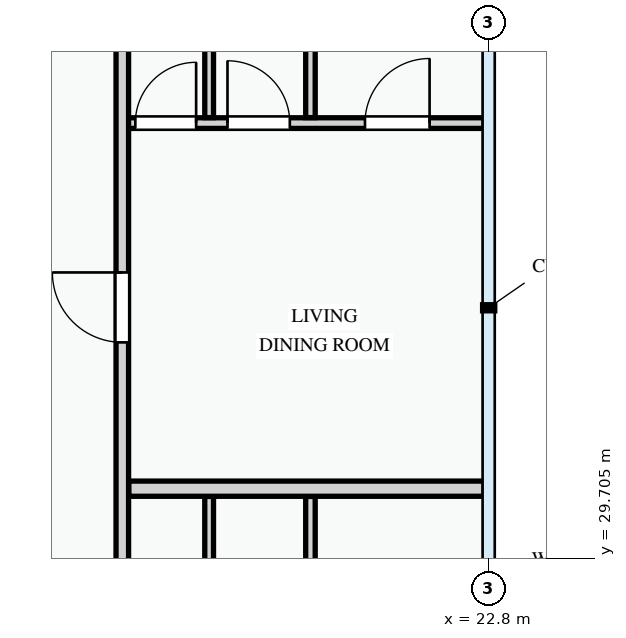
"""IFC4 building model, lengths in metres.
Left out: names, types, materials, properties, quantities, classifications, styles, units other than length and angle.
Written with IfcOpenShell. Run it as: python <this file> out.ifc"""

import sys

from ifc_helpers import new_model, si_unit, direction, frame, frame_2d, origin, place, context, subcontext, project, spatial, rectangle, extrude, element, fill, save


model = new_model("IFC4")
c1 = context("Model", 3, precision=1e-05, world=origin(), true_north=direction((0.0, 1.0)))
c2 = subcontext(c1, "Body", "Model", "MODEL_VIEW")
j1 = project(units=[si_unit("LENGTHUNIT", "METRE"), si_unit("PLANEANGLEUNIT", "RADIAN")], contexts=[c1])
p1 = place(None, origin())
s1 = spatial("IfcSite", under=j1, at=p1, CompositionType="ELEMENT")
p2 = place(p1, origin())
s2 = spatial("IfcBuilding", under=s1, at=p2, CompositionType="ELEMENT")
p3 = place(p2, frame((0.0, 0.0, 31.2)))
s3 = spatial("IfcBuildingStorey", under=s2, at=p3, CompositionType="ELEMENT", Elevation=31.2)
p4 = place(p3, frame((20.455, 26.553, 0.0), z_axis=(0.0, 0.0, 1.0), x_axis=(0.0, 1.0, 0.0)))
e1 = element("IfcWall", 1, at=p4, inside=s3, PredefinedType="PARTITIONING", context=c2, shape_type="SweptSolid", body=[
    extrude(rectangle(XDim=3.965, YDim=0.125, at=frame_2d((1.983, 0.0))), origin(), (0.0, 0.0, 1.0), 3.0),
])
p5 = place(p3, frame((19.122, 26.553, 0.0), z_axis=(0.0, 0.0, 1.0), x_axis=(0.0, 1.0, 0.0)))
e2 = element("IfcWall", 2, at=p5, inside=s3, PredefinedType="PARTITIONING", context=c2, shape_type="SweptSolid", body=[
    extrude(rectangle(XDim=3.965, YDim=0.115, at=frame_2d((1.983, 0.0))), origin(), (0.0, 0.0, 1.0), 3.0),
])
p6 = place(p3, frame((17.98, 35.43, 0.0), z_axis=(0.0, 0.0, 1.0), x_axis=(1.0, 0.0, 0.0)))
e3 = element("IfcWall", 3, at=p6, inside=s3, PredefinedType="PARTITIONING", context=c2, shape_type="SweptSolid", body=[
    extrude(rectangle(XDim=4.76, YDim=0.14, at=frame_2d((2.38, 0.0))), origin(), (0.0, 0.0, 1.0), 3.0),
])
p7 = place(p6, frame((0.171, 0.0, 0.0)))
e4 = element("IfcOpeningElement", 4, at=p7, cuts=e3, PredefinedType="OPENING", context=c2, shape_type="SweptSolid", body=[
    extrude(rectangle(XDim=0.8, YDim=2.1, at=frame_2d((0.4, 1.05))), frame((0.0, 0.08, 0.0), z_axis=(0.0, -1.0, 0.0), x_axis=(1.0, 0.0, 0.0)), (0.0, 0.0, 1.0), 0.16),
])
p8 = place(p6, frame((1.384, 0.0, 0.0)))
e5 = element("IfcOpeningElement", 5, at=p8, cuts=e3, PredefinedType="OPENING", context=c2, shape_type="SweptSolid", body=[
    extrude(rectangle(XDim=0.82, YDim=2.08, at=frame_2d((0.41, 1.04))), frame((0.0, 0.08, 0.0), z_axis=(0.0, -1.0, 0.0), x_axis=(1.0, 0.0, 0.0)), (0.0, 0.0, 1.0), 0.16),
])
p9 = place(p6, frame((3.193, 0.0, 0.0)))
e6 = element("IfcOpeningElement", 6, at=p9, cuts=e3, PredefinedType="OPENING", context=c2, shape_type="SweptSolid", body=[
    extrude(rectangle(XDim=0.85, YDim=2.1, at=frame_2d((0.425, 1.05))), frame((0.0, 0.08, 0.0), z_axis=(0.0, -1.0, 0.0), x_axis=(1.0, 0.0, 0.0)), (0.0, 0.0, 1.0), 0.16),
])
p10 = place(p3, frame((20.455, 35.502, 0.0), z_axis=(0.0, 0.0, 1.0), x_axis=(0.0, 1.0, 0.0)))
e7 = element("IfcWall", 7, at=p10, inside=s3, PredefinedType="PARTITIONING", context=c2, shape_type="SweptSolid", body=[
    extrude(rectangle(XDim=7.569, YDim=0.125, at=frame_2d((3.784, 0.0))), origin(), (0.0, 0.0, 1.0), 3.0),
])
p11 = place(p3, frame((19.122, 35.502, 0.0), z_axis=(0.0, 0.0, 1.0), x_axis=(0.0, 1.0, 0.0)))
e8 = element("IfcWall", 8, at=p11, inside=s3, PredefinedType="PARTITIONING", context=c2, shape_type="SweptSolid", body=[
    extrude(rectangle(XDim=7.569, YDim=0.115, at=frame_2d((3.784, 0.0))), origin(), (0.0, 0.0, 1.0), 3.0),
])
p12 = place(p3, frame((18.064, 30.62, 0.0), z_axis=(0.0, 0.0, 1.0), x_axis=(1.0, 0.0, 0.0)))
e9 = element("IfcWall", 9, at=p12, inside=s3, PredefinedType="PARTITIONING", context=c2, shape_type="SweptSolid", body=[
    extrude(rectangle(XDim=4.676, YDim=0.2, at=frame_2d((2.338, 0.0))), origin(), (0.0, 0.0, 1.0), 3.0),
])
p13 = place(p3, frame((17.98, 22.66, 0.0), z_axis=(0.0, 0.0, 1.0), x_axis=(0.0, 1.0, 0.0)))
e10 = element("IfcWall", 10, at=p13, inside=s3, PredefinedType="PARTITIONING", context=c2, shape_type="SweptSolid", body=[
    extrude(rectangle(XDim=20.411, YDim=0.165, at=frame_2d((10.205, 0.0))), origin(), (0.0, 0.0, 1.0), 3.0),
])
p14 = place(p13, frame((2.611, 0.0, 0.0)))
e11 = element("IfcOpeningElement", 11, at=p14, cuts=e10, PredefinedType="OPENING", context=c2, shape_type="SweptSolid", body=[
    extrude(rectangle(XDim=0.92, YDim=2.1, at=frame_2d((0.46, 1.05))), frame((0.0, 0.093, 0.0), z_axis=(0.0, -1.0, 0.0), x_axis=(1.0, 0.0, 0.0)), (0.0, 0.0, 1.0), 0.185),
])
p15 = place(p13, frame((9.885, 0.0, 0.0)))
e12 = element("IfcOpeningElement", 12, at=p15, cuts=e10, PredefinedType="OPENING", context=c2, shape_type="SweptSolid", body=[
    extrude(rectangle(XDim=0.92, YDim=2.1, at=frame_2d((0.46, 1.05))), frame((0.0, 0.093, 0.0), z_axis=(0.0, -1.0, 0.0), x_axis=(1.0, 0.0, 0.0)), (0.0, 0.0, 1.0), 0.185),
])
p16 = place(p7, origin())
e13 = element("IfcDoor", 13, at=p16, inside=s3, OperationType="SINGLE_SWING_RIGHT", PredefinedType="DOOR", context=c2, shape_type="SweptSolid", body=[
    extrude(rectangle(XDim=0.8, YDim=2.1, at=frame_2d((0.4, 1.05))), frame((0.0, 0.025, 0.0), z_axis=(0.0, -1.0, 0.0), x_axis=(1.0, 0.0, 0.0)), (0.0, 0.0, 1.0), 0.05),
])
fill(e4, e13)
p17 = place(p8, origin())
e14 = element("IfcDoor", 14, at=p17, inside=s3, OperationType="SINGLE_SWING_LEFT", PredefinedType="DOOR", context=c2, shape_type="SweptSolid", body=[
    extrude(rectangle(XDim=0.82, YDim=2.08, at=frame_2d((0.41, 1.04))), frame((0.0, 0.025, 0.0), z_axis=(0.0, -1.0, 0.0), x_axis=(1.0, 0.0, 0.0)), (0.0, 0.0, 1.0), 0.05),
])
fill(e5, e14)
p18 = place(p9, origin())
e15 = element("IfcDoor", 15, at=p18, inside=s3, OperationType="SINGLE_SWING_RIGHT", PredefinedType="DOOR", context=c2, shape_type="SweptSolid", body=[
    extrude(rectangle(XDim=0.85, YDim=2.1, at=frame_2d((0.425, 1.05))), frame((0.0, 0.025, 0.0), z_axis=(0.0, -1.0, 0.0), x_axis=(1.0, 0.0, 0.0)), (0.0, 0.0, 1.0), 0.05),
])
fill(e6, e15)
p19 = place(p15, origin())
e16 = element("IfcDoor", 16, at=p19, inside=s3, OperationType="SINGLE_SWING_RIGHT", PredefinedType="DOOR", context=c2, shape_type="SweptSolid", body=[
    extrude(rectangle(XDim=0.92, YDim=2.1, at=frame_2d((0.46, 1.05))), frame((0.0, 0.025, 0.0), z_axis=(0.0, -1.0, 0.0), x_axis=(1.0, 0.0, 0.0)), (0.0, 0.0, 1.0), 0.05),
])
fill(e12, e16)
save(model, sys.argv[1])
